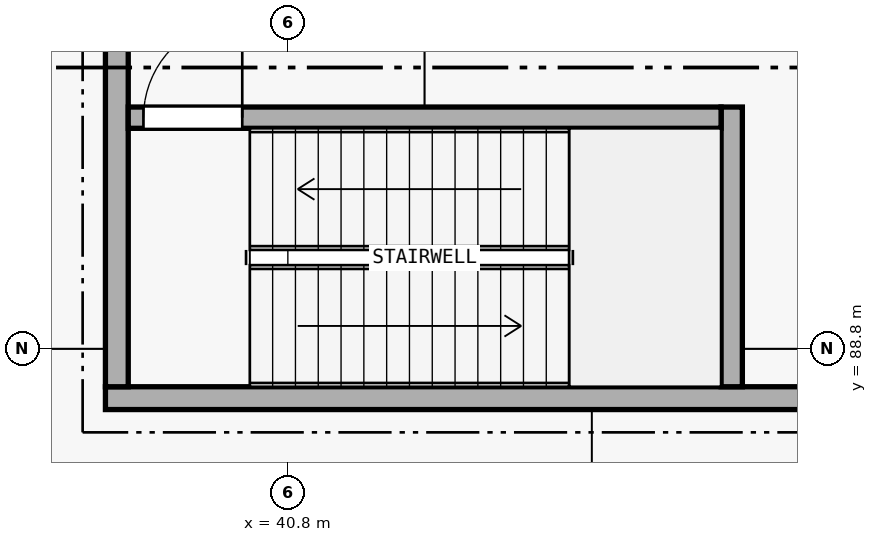
"""IFC4 building model, lengths in metres.
Left out: names, types, materials, properties, quantities, classifications, styles, units other than length and angle.
Written with IfcOpenShell. Run it as: python <this file> out.ifc"""

import sys

from ifc_helpers import new_model, si_unit, direction, frame, frame_2d, origin, place, context, subcontext, project, spatial, rectangle, extrude, element, fill, save


model = new_model("IFC4")
c1 = context("Model", 3, precision=1e-05, world=origin(), true_north=direction((0.0, 1.0)))
c2 = subcontext(c1, "Body", "Model", "MODEL_VIEW")
j1 = project(units=[si_unit("LENGTHUNIT", "METRE"), si_unit("PLANEANGLEUNIT", "RADIAN")], contexts=[c1])
p1 = place(None, origin())
s1 = spatial("IfcSite", under=j1, at=p1, CompositionType="ELEMENT")
p2 = place(p1, origin())
s2 = spatial("IfcBuilding", under=s1, at=p2, CompositionType="ELEMENT")
p3 = place(p2, origin())
s3 = spatial("IfcBuildingStorey", under=s2, at=p3, CompositionType="ELEMENT", Elevation=0.0)
p4 = place(p3, frame((38.4, 88.15, 0.0), z_axis=(0.0, 0.0, 1.0), x_axis=(1.0, 0.0, 0.0)))
e1 = element("IfcWall", 1, at=p4, inside=s3, PredefinedType="SHEAR", context=c2, shape_type="SweptSolid", body=[
    extrude(rectangle(XDim=16.0, YDim=0.3, at=frame_2d((8.0, 0.0))), origin(), (0.0, 0.0, 1.0), 5.395),
])
p5 = place(p3, frame((38.55, 88.3, 0.0), z_axis=(0.0, 0.0, 1.0), x_axis=(0.0, 1.0, 0.0)))
e2 = element("IfcWall", 2, at=p5, inside=s3, PredefinedType="SHEAR", context=c2, shape_type="SweptSolid", body=[
    extrude(rectangle(XDim=5.8, YDim=0.3, at=frame_2d((2.9, 0.0))), origin(), (0.0, 0.0, 1.0), 5.395),
])
p6 = place(p3, frame((46.64, 88.3, 0.0), z_axis=(0.0, 0.0, 1.0), x_axis=(0.0, 1.0, 0.0)))
e3 = element("IfcWall", 3, at=p6, inside=s3, PredefinedType="SHEAR", context=c2, shape_type="SweptSolid", body=[
    extrude(rectangle(XDim=3.68, YDim=0.28, at=frame_2d((1.84, 0.0))), origin(), (0.0, 0.0, 1.0), 5.395),
])
p7 = place(p3, frame((38.7, 91.84, 0.0), z_axis=(0.0, 0.0, 1.0), x_axis=(1.0, 0.0, 0.0)))
e4 = element("IfcWall", 4, at=p7, inside=s3, PredefinedType="SHEAR", context=c2, shape_type="SweptSolid", body=[
    extrude(rectangle(XDim=7.8, YDim=0.28, at=frame_2d((3.9, 0.0))), origin(), (0.0, 0.0, 1.0), 5.395),
])
p8 = place(p7, frame((0.2, 0.0, 0.0)))
e5 = element("IfcOpeningElement", 5, at=p8, cuts=e4, PredefinedType="OPENING", context=c2, shape_type="SweptSolid", body=[
    extrude(rectangle(XDim=1.3, YDim=2.2, at=frame_2d((0.65, 1.1))), frame((0.0, 0.15, 0.0), z_axis=(0.0, -1.0, 0.0), x_axis=(1.0, 0.0, 0.0)), (0.0, 0.0, 1.0), 0.3),
])
p9 = place(p8, origin())
e6 = element("IfcDoor", 6, at=p9, inside=s3, OperationType="SINGLE_SWING_RIGHT", PredefinedType="DOOR", context=c2, shape_type="SweptSolid", body=[
    extrude(rectangle(XDim=1.3, YDim=2.2, at=frame_2d((0.65, 1.1))), frame((0.0, 0.025, 0.0), z_axis=(0.0, -1.0, 0.0), x_axis=(1.0, 0.0, 0.0)), (0.0, 0.0, 1.0), 0.05),
])
fill(e5, e6)
save(model, sys.argv[1])
